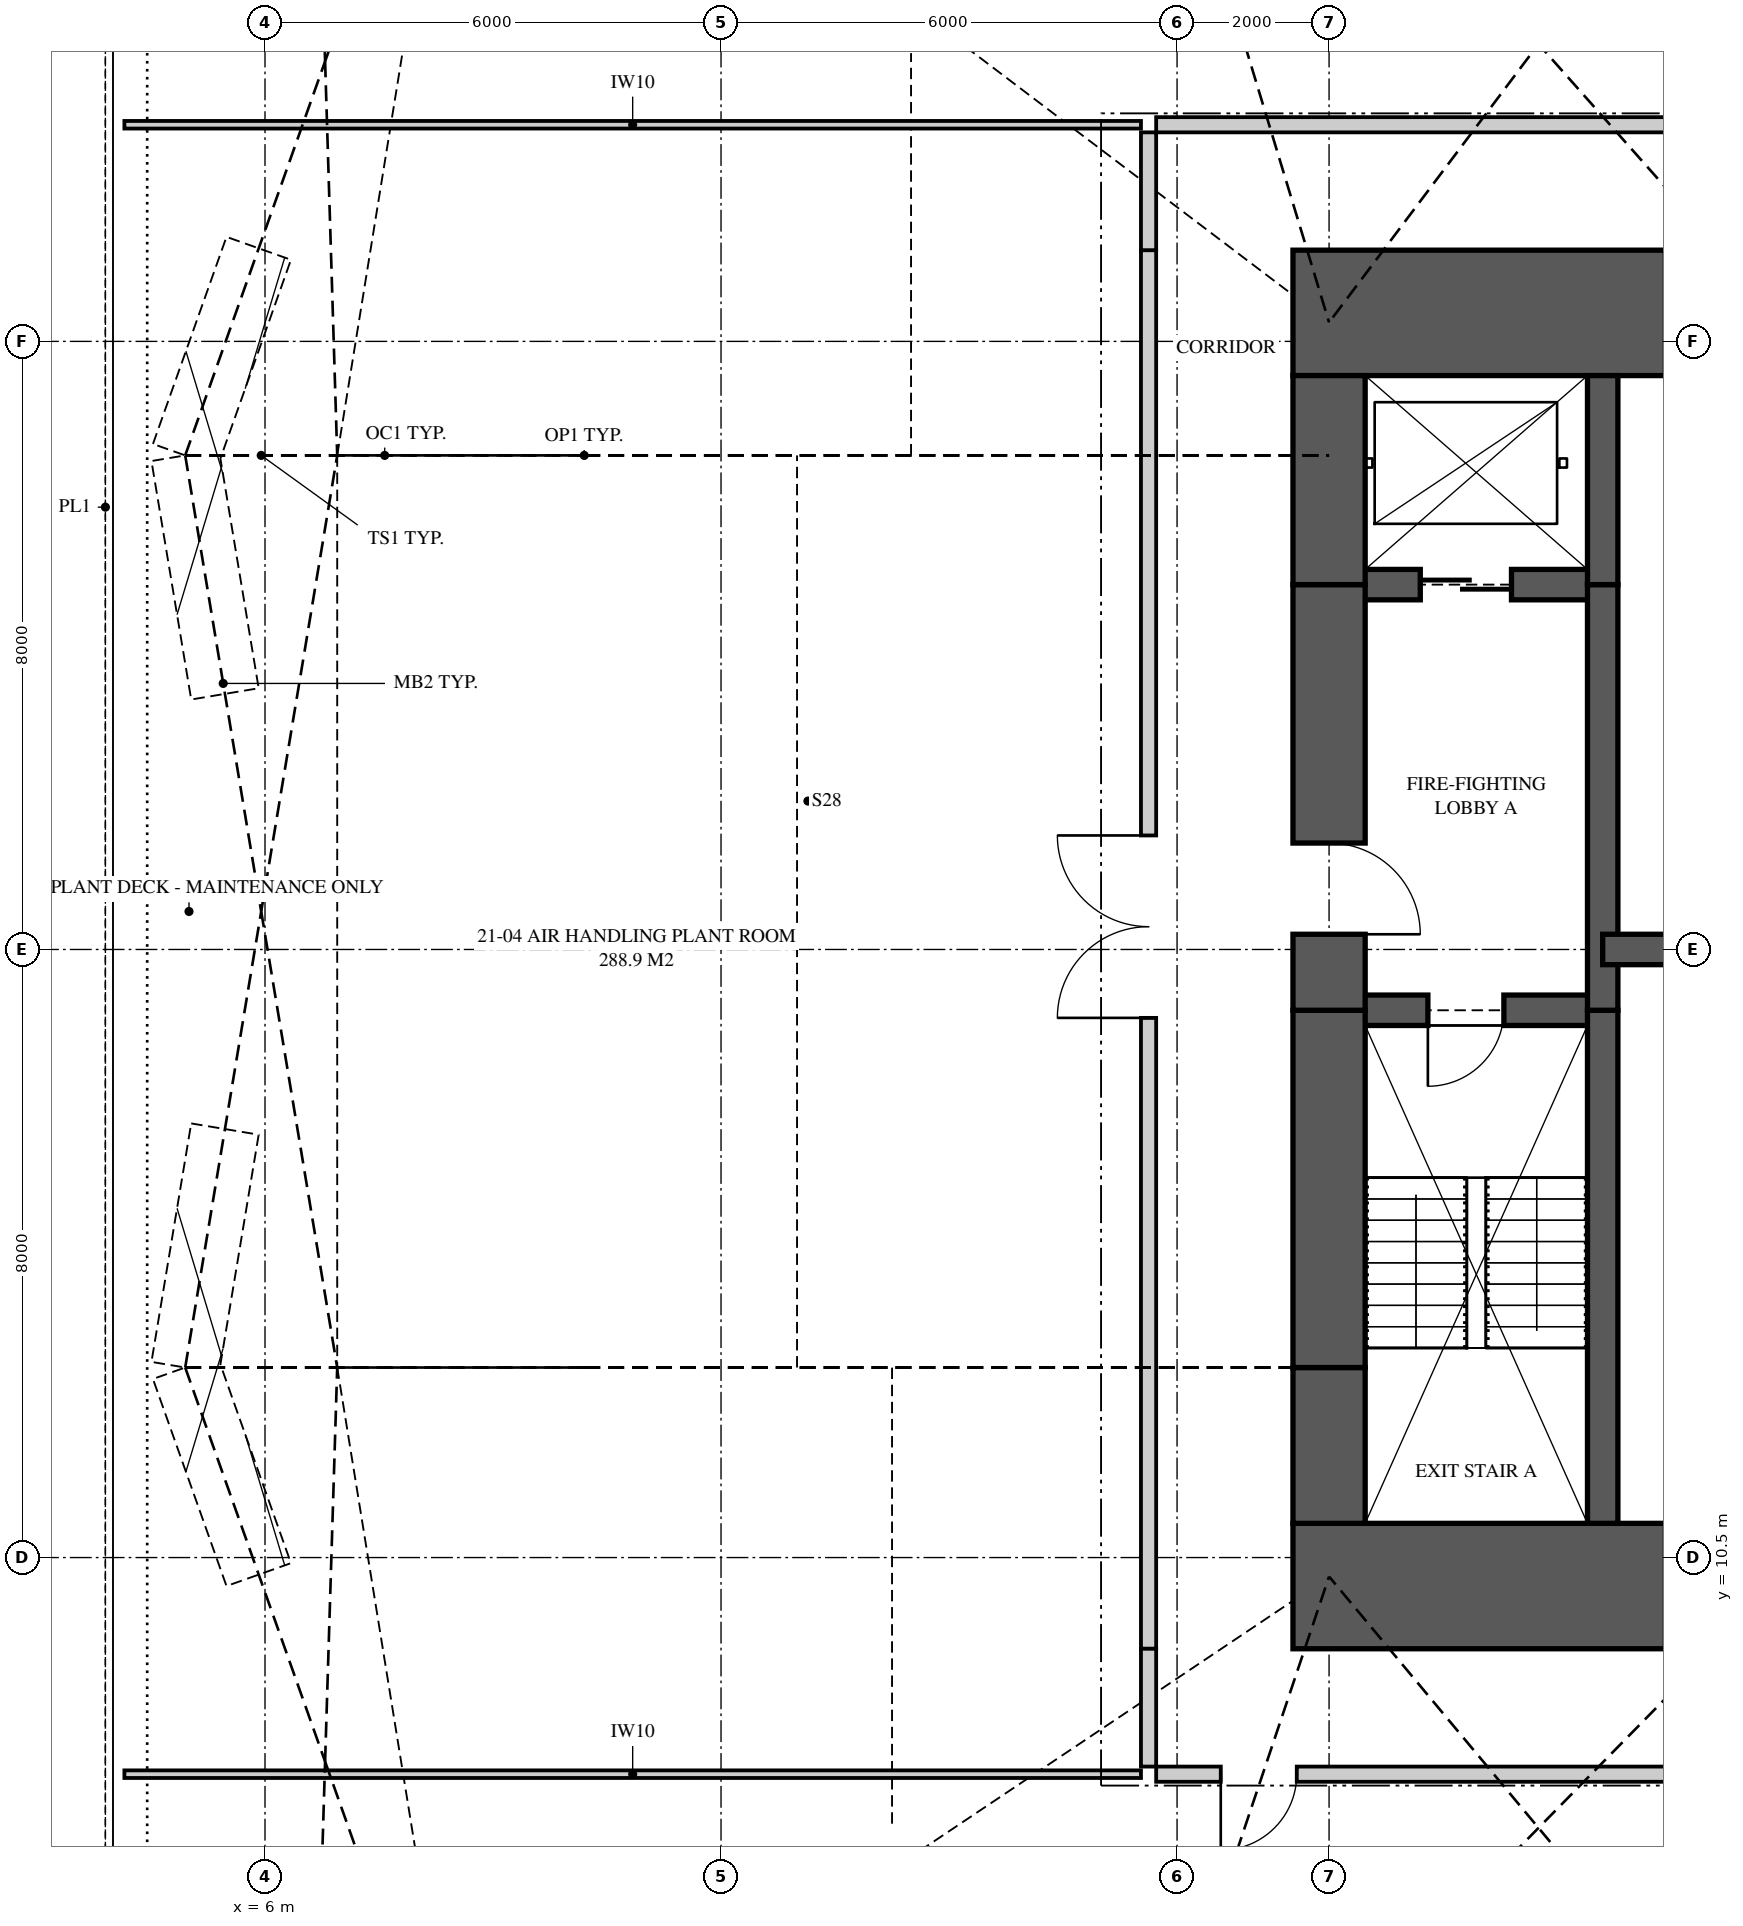
"""IFC4 building model, lengths in metres.
Left out: names, types, materials, properties, quantities, classifications, styles, units other than length and angle.
Written with IfcOpenShell. Run it as: python <this file> out.ifc"""

import sys

from ifc_helpers import new_model, si_unit, direction, frame, frame_2d, origin, place, context, subcontext, project, spatial, polyline, rectangle, outline, extrude, element, fill, save


model = new_model("IFC4")
c1 = context("Model", 3, precision=1e-05, world=origin(), true_north=direction((0.0, 1.0)))
c2 = subcontext(c1, "Body", "Model", "MODEL_VIEW")
j1 = project(units=[si_unit("LENGTHUNIT", "METRE"), si_unit("PLANEANGLEUNIT", "RADIAN")], contexts=[c1])
p1 = place(None, origin())
s1 = spatial("IfcSite", under=j1, at=p1, CompositionType="ELEMENT")
p2 = place(p1, origin())
s2 = spatial("IfcBuilding", under=s1, at=p2, CompositionType="ELEMENT")
p3 = place(p2, frame((0.0, 0.0, 79.75)))
s3 = spatial("IfcBuildingStorey", under=s2, at=p3, CompositionType="ELEMENT", Elevation=79.75)
p4 = place(p3, frame((19.525, 10.125, 0.0), z_axis=(0.0, 0.0, 1.0), x_axis=(1.0, 0.0, 0.0)))
e1 = element("IfcWall", 1, at=p4, inside=s3, PredefinedType="SHEAR", context=c2, shape_type="SweptSolid", body=[
    extrude(rectangle(XDim=6.475, YDim=1.65, at=frame_2d((3.238, 0.0))), origin(), (0.0, 0.0, 1.0), 5.0),
])
p5 = place(p4, frame((4.9, 0.0, 0.0)))
e2 = element("IfcOpeningElement", 2, at=p5, cuts=e1, PredefinedType="OPENING", context=c2, shape_type="SweptSolid", body=[
    extrude(rectangle(XDim=0.75, YDim=2.1, at=frame_2d((0.375, 1.05))), frame((0.0, 0.835, 0.0), z_axis=(0.0, -1.0, 0.0), x_axis=(1.0, 0.0, 0.0)), (0.0, 0.0, 1.0), 1.67),
])
p6 = place(p3, frame((26.0, 26.875, 0.0), z_axis=(0.0, 0.0, 1.0), x_axis=(-1.0, 0.0, 0.0)))
e3 = element("IfcWall", 3, at=p6, inside=s3, PredefinedType="SHEAR", context=c2, shape_type="SweptSolid", body=[
    extrude(rectangle(XDim=6.475, YDim=1.65, at=frame_2d((3.238, 0.0))), origin(), (0.0, 0.0, 1.0), 5.0),
])
p7 = place(p6, frame((0.825, 0.0, 0.0)))
e4 = element("IfcOpeningElement", 4, at=p7, cuts=e3, PredefinedType="OPENING", context=c2, shape_type="SweptSolid", body=[
    extrude(rectangle(XDim=0.75, YDim=2.1, at=frame_2d((0.375, 1.05))), frame((0.0, 0.835, 0.0), z_axis=(0.0, -1.0, 0.0), x_axis=(1.0, 0.0, 0.0)), (0.0, 0.0, 1.0), 1.67),
])
p8 = place(p3, frame((20.0, 26.05, 0.0), z_axis=(0.0, 0.0, 1.0), x_axis=(0.0, -1.0, 0.0)))
e5 = element("IfcWall", 5, at=p8, inside=s3, PredefinedType="SHEAR", context=c2, shape_type="SweptSolid", body=[
    extrude(rectangle(XDim=2.75, YDim=0.95, at=frame_2d((1.375, 0.0))), origin(), (0.0, 0.0, 1.0), 5.0),
])
p9 = place(p3, frame((20.0, 23.3, 0.0), z_axis=(0.0, 0.0, 1.0), x_axis=(0.0, -1.0, 0.0)))
e6 = element("IfcWall", 6, at=p9, inside=s3, PredefinedType="SHEAR", context=c2, shape_type="SweptSolid", body=[
    extrude(rectangle(XDim=5.6, YDim=0.95, at=frame_2d((2.8, 0.0))), origin(), (0.0, 0.0, 1.0), 5.0),
])
p10 = place(p9, frame((3.4, 0.0, 0.0)))
e7 = element("IfcOpeningElement", 7, at=p10, cuts=e6, PredefinedType="OPENING", context=c2, shape_type="SweptSolid", body=[
    extrude(rectangle(XDim=1.2, YDim=2.2, at=frame_2d((0.6, 1.1))), frame((0.0, 0.485, 0.0), z_axis=(0.0, -1.0, 0.0), x_axis=(1.0, 0.0, 0.0)), (0.0, 0.0, 1.0), 0.97),
])
p11 = place(p3, frame((20.0, 17.7, 0.0), z_axis=(0.0, 0.0, 1.0), x_axis=(0.0, -1.0, 0.0)))
e8 = element("IfcWall", 8, at=p11, inside=s3, PredefinedType="SHEAR", context=c2, shape_type="SweptSolid", body=[
    extrude(rectangle(XDim=4.7, YDim=0.95, at=frame_2d((2.35, 0.0))), origin(), (0.0, 0.0, 1.0), 5.0),
])
p12 = place(p3, frame((20.0, 13.0, 0.0), z_axis=(0.0, 0.0, 1.0), x_axis=(0.0, -1.0, 0.0)))
e9 = element("IfcWall", 9, at=p12, inside=s3, PredefinedType="SHEAR", context=c2, shape_type="SweptSolid", body=[
    extrude(rectangle(XDim=2.05, YDim=0.95, at=frame_2d((1.025, 0.0))), origin(), (0.0, 0.0, 1.0), 5.0),
])
p13 = place(p3, frame((23.6, 10.95, 0.0), z_axis=(0.0, 0.0, 1.0), x_axis=(0.0, 1.0, 0.0)))
e10 = element("IfcWall", 10, at=p13, inside=s3, PredefinedType="SHEAR", context=c2, shape_type="SweptSolid", body=[
    extrude(rectangle(XDim=6.75, YDim=0.4, at=frame_2d((3.375, 0.0))), origin(), (0.0, 0.0, 1.0), 5.0),
])
p14 = place(p3, frame((23.6, 17.7, 0.0), z_axis=(0.0, 0.0, 1.0), x_axis=(0.0, 1.0, 0.0)))
e11 = element("IfcWall", 11, at=p14, inside=s3, PredefinedType="SHEAR", context=c2, shape_type="SweptSolid", body=[
    extrude(rectangle(XDim=5.6, YDim=0.4, at=frame_2d((2.8, 0.0))), origin(), (0.0, 0.0, 1.0), 5.0),
])
p15 = place(p3, frame((23.6, 23.3, 0.0), z_axis=(0.0, 0.0, 1.0), x_axis=(0.0, 1.0, 0.0)))
e12 = element("IfcWall", 12, at=p15, inside=s3, PredefinedType="SHEAR", context=c2, shape_type="SweptSolid", body=[
    extrude(rectangle(XDim=2.75, YDim=0.4, at=frame_2d((1.375, 0.0))), origin(), (0.0, 0.0, 1.0), 5.0),
])
p16 = place(p3, frame((20.0, 17.7, 0.0), z_axis=(0.0, 0.0, 1.0), x_axis=(1.0, 0.0, 0.0)))
e13 = element("IfcWall", 13, at=p16, inside=s3, PredefinedType="SHEAR", context=c2, shape_type="SweptSolid", body=[
    extrude(rectangle(XDim=3.6, YDim=0.4, at=frame_2d((1.8, 0.0))), origin(), (0.0, 0.0, 1.0), 5.0),
])
p17 = place(p16, frame((1.3, 0.0, 0.0)))
e14 = element("IfcOpeningElement", 14, at=p17, cuts=e13, PredefinedType="OPENING", context=c2, shape_type="SweptSolid", body=[
    extrude(rectangle(XDim=1.0, YDim=2.1, at=frame_2d((0.5, 1.05))), frame((0.0, 0.21, 0.0), z_axis=(0.0, -1.0, 0.0), x_axis=(1.0, 0.0, 0.0)), (0.0, 0.0, 1.0), 0.42),
])
p18 = place(p3, frame((20.0, 23.3, 0.0), z_axis=(0.0, 0.0, 1.0), x_axis=(1.0, 0.0, 0.0)))
e15 = element("IfcWall", 15, at=p18, inside=s3, PredefinedType="SHEAR", context=c2, shape_type="SweptSolid", body=[
    extrude(rectangle(XDim=3.6, YDim=0.4, at=frame_2d((1.8, 0.0))), origin(), (0.0, 0.0, 1.0), 5.0),
])
p19 = place(p18, frame((1.2, 0.0, 0.0)))
e16 = element("IfcOpeningElement", 16, at=p19, cuts=e15, PredefinedType="OPENING", context=c2, shape_type="SweptSolid", body=[
    extrude(rectangle(XDim=1.2, YDim=2.1, at=frame_2d((0.6, 1.05))), frame((0.0, 0.21, 0.0), z_axis=(0.0, -1.0, 0.0), x_axis=(1.0, 0.0, 0.0)), (0.0, 0.0, 1.0), 0.42),
])
p20 = place(p3, frame((23.6, 18.5, 0.0), z_axis=(0.0, 0.0, 1.0), x_axis=(1.0, 0.0, 0.0)))
e17 = element("IfcWall", 17, at=p20, inside=s3, PredefinedType="SHEAR", context=c2, shape_type="SweptSolid", body=[
    extrude(rectangle(XDim=2.4, YDim=0.4, at=frame_2d((1.2, 0.0))), origin(), (0.0, 0.0, 1.0), 5.0),
])
p21 = place(p3, frame((17.725, 7.65, 0.0), z_axis=(0.0, 0.0, 1.0), x_axis=(1.0, 0.0, 0.0)))
e18 = element("IfcWall", 18, at=p21, inside=s3, PredefinedType="PARTITIONING", context=c2, shape_type="SweptSolid", body=[
    extrude(outline(polyline([(28.35, 0.0), (28.35, 4.72), (27.701, 4.72), (27.701, 3.22), (26.543, 3.22), (26.543, 4.72), (25.152, 4.72), (25.152, 4.141), (24.302, 4.141), (24.302, 4.72), (16.298, 4.72), (16.298, 4.141), (15.495, 4.141), (15.495, 4.72), (14.133, 4.72), (14.133, 4.141), (13.223, 4.141), (13.223, 4.72), (10.314, 4.72), (10.314, 4.194), (9.736, 4.194), (9.736, 4.72), (6.153, 4.72), (6.153, 4.141), (5.295, 4.141), (5.295, 4.72), (4.833, 4.72), (4.833, 4.141), (4.051, 4.141), (4.051, 4.72), (1.684, 4.72), (1.684, 4.141), (1.119, 4.141), (1.119, 4.72), (0.0, 4.72), (0.0, 0.0), (28.35, 0.0)]), holes=[polyline([(9.18, 3.208), (9.224, 3.323), (9.821, 3.385), (9.821, 2.858), (9.778, 2.743), (9.18, 2.68), (9.18, 3.208)])]), frame((0.0, 0.1, 0.0), z_axis=(0.0, -1.0, 0.0), x_axis=(1.0, 0.0, 0.0)), (0.0, 0.0, 1.0), 0.2),
])
p22 = place(p21, frame((0.85, 0.0, 0.0)))
e19 = element("IfcOpeningElement", 19, at=p22, cuts=e18, PredefinedType="OPENING", context=c2, shape_type="SweptSolid", body=[
    extrude(rectangle(XDim=1.0, YDim=2.1, at=frame_2d((0.5, 1.05))), frame((0.0, 0.11, 0.0), z_axis=(0.0, -1.0, 0.0), x_axis=(1.0, 0.0, 0.0)), (0.0, 0.0, 1.0), 0.22),
])
p23 = place(p21, frame((26.5, 0.0, 0.0)))
e20 = element("IfcOpeningElement", 20, at=p23, cuts=e18, PredefinedType="OPENING", context=c2, shape_type="SweptSolid", body=[
    extrude(rectangle(XDim=1.0, YDim=2.1, at=frame_2d((0.5, 1.05))), frame((0.0, 0.11, 0.0), z_axis=(0.0, -1.0, 0.0), x_axis=(1.0, 0.0, 0.0)), (0.0, 0.0, 1.0), 0.22),
])
p24 = place(p3, frame((17.625, 7.75, 0.0), z_axis=(0.0, 0.0, 1.0), x_axis=(0.0, 1.0, 0.0)))
e21 = element("IfcWall", 21, at=p24, inside=s3, PredefinedType="PARTITIONING", context=c2, shape_type="SweptSolid", body=[
    extrude(outline(polyline([(0.0, 0.0), (1.55, 0.0), (1.55, 3.22), (0.24, 3.22), (0.24, 4.72), (0.0, 4.72), (0.0, 0.0)])), frame((0.0, 0.1, 0.0), z_axis=(0.0, -1.0, 0.0), x_axis=(1.0, 0.0, 0.0)), (0.0, 0.0, 1.0), 0.2),
])
p25 = place(p3, frame((17.725, 29.35, 0.0), z_axis=(0.0, 0.0, 1.0), x_axis=(1.0, 0.0, 0.0)))
e22 = element("IfcWall", 22, at=p25, inside=s3, PredefinedType="PARTITIONING", context=c2, shape_type="SweptSolid", body=[
    extrude(outline(polyline([(28.35, 0.0), (28.35, 4.72), (27.567, 4.72), (27.567, 3.22), (26.434, 3.22), (26.434, 4.72), (25.083, 4.72), (25.083, 4.141), (24.111, 4.141), (24.111, 4.72), (16.498, 4.72), (16.498, 4.141), (15.737, 4.141), (15.737, 4.72), (13.833, 4.72), (13.833, 4.141), (12.979, 4.141), (12.979, 4.72), (10.314, 4.72), (10.314, 4.194), (9.736, 4.194), (9.736, 4.72), (6.376, 4.72), (6.376, 4.141), (5.567, 4.141), (5.567, 4.72), (4.602, 4.72), (4.602, 4.141), (3.861, 4.141), (3.861, 4.72), (1.763, 4.72), (1.763, 4.141), (1.209, 4.141), (1.209, 4.72), (0.0, 4.72), (0.0, 0.0), (28.35, 0.0)]), holes=[polyline([(9.234, 3.349), (9.274, 3.453), (9.869, 3.504), (9.869, 2.988), (9.83, 2.883), (9.234, 2.832), (9.234, 3.349)])]), frame((0.0, 0.1, 0.0), z_axis=(0.0, -1.0, 0.0), x_axis=(1.0, 0.0, 0.0)), (0.0, 0.0, 1.0), 0.2),
])
p26 = place(p25, frame((13.275, 0.0, 0.0)))
e23 = element("IfcOpeningElement", 23, at=p26, cuts=e22, PredefinedType="OPENING", context=c2, shape_type="SweptSolid", body=[
    extrude(rectangle(XDim=2.4, YDim=2.4, at=frame_2d((1.2, 1.2))), frame((0.0, 0.11, 0.0), z_axis=(0.0, -1.0, 0.0), x_axis=(1.0, 0.0, 0.0)), (0.0, 0.0, 1.0), 0.22),
])
p27 = place(p3, frame((17.625, 27.7, 0.0), z_axis=(0.0, 0.0, 1.0), x_axis=(0.0, 1.0, 0.0)))
e24 = element("IfcWall", 24, at=p27, inside=s3, PredefinedType="PARTITIONING", context=c2, shape_type="SweptSolid", body=[
    extrude(outline(polyline([(0.0, 0.0), (1.55, 0.0), (1.55, 3.22), (0.147, 3.22), (0.147, 4.72), (0.0, 4.72), (0.0, 0.0)])), frame((0.0, 0.1, 0.0), z_axis=(0.0, -1.0, 0.0), x_axis=(1.0, 0.0, 0.0)), (0.0, 0.0, 1.0), 0.2),
])
p28 = place(p3, frame((17.625, 9.3, 0.0), z_axis=(0.0, 0.0, 1.0), x_axis=(0.0, 1.0, 0.0)))
e25 = element("IfcWall", 25, at=p28, inside=s3, PredefinedType="PARTITIONING", context=c2, shape_type="SweptSolid", body=[
    extrude(outline(polyline([(18.4, 0.0), (18.4, 4.72), (16.2, 4.72), (16.2, 3.72), (15.2, 3.72), (15.2, 4.72), (4.2, 4.72), (4.2, 3.72), (3.2, 3.72), (3.2, 4.72), (0.027, 4.72), (0.027, 3.22), (0.0, 3.22), (0.0, 0.0), (18.4, 0.0)]), holes=[polyline([(3.454, 2.622), (3.454, 3.394), (3.946, 3.394), (3.946, 2.622), (3.454, 2.622)]), polyline([(15.454, 2.622), (15.454, 3.394), (15.946, 3.394), (15.946, 2.622), (15.454, 2.622)])]), frame((0.0, 0.1, 0.0), z_axis=(0.0, -1.0, 0.0), x_axis=(1.0, 0.0, 0.0)), (0.0, 0.0, 1.0), 0.2),
])
p29 = place(p28, frame((8.3, 0.0, 0.0)))
e26 = element("IfcOpeningElement", 26, at=p29, cuts=e25, PredefinedType="OPENING", context=c2, shape_type="SweptSolid", body=[
    extrude(rectangle(XDim=2.4, YDim=2.4, at=frame_2d((1.2, 1.2))), frame((0.0, 0.11, 0.0), z_axis=(0.0, -1.0, 0.0), x_axis=(1.0, 0.0, 0.0)), (0.0, 0.0, 1.0), 0.22),
])
p30 = place(p3, frame((4.15, 7.65, 0.0), z_axis=(0.0, 0.0, 1.0), x_axis=(1.0, 0.0, 0.0)))
e27 = element("IfcWall", 27, at=p30, inside=s3, PredefinedType="PARTITIONING", context=c2, shape_type="SweptSolid", body=[
    extrude(outline(polyline([(2.796, 4.72), (0.0, 4.72), (0.0, 0.0), (13.375, 0.0), (13.375, 4.72), (12.943, 4.72), (12.943, 3.22), (10.997, 3.22), (10.997, 4.12), (8.84, 4.12), (8.84, 4.72), (4.539, 4.72), (4.539, 2.9), (2.796, 2.9), (2.796, 4.72)]), holes=[polyline([(2.224, 1.047), (2.224, 1.936), (2.226, 1.973), (2.228, 1.991), (2.247, 1.991), (2.247, 2.03), (2.287, 2.081), (3.152, 2.205), (3.152, 1.32), (3.112, 1.269), (3.047, 1.26), (3.047, 1.114), (3.044, 1.059), (2.224, 1.047)])]), frame((0.0, 0.05, 0.0), z_axis=(0.0, -1.0, 0.0), x_axis=(1.0, 0.0, 0.0)), (0.0, 0.0, 1.0), 0.1),
])
p31 = place(p3, frame((4.15, 29.35, 0.0), z_axis=(0.0, 0.0, 1.0), x_axis=(1.0, 0.0, 0.0)))
e28 = element("IfcWall", 28, at=p31, inside=s3, PredefinedType="PARTITIONING", context=c2, shape_type="SweptSolid", body=[
    extrude(outline(polyline([(2.634, 4.72), (0.0, 4.72), (0.0, 0.0), (13.375, 0.0), (13.375, 4.72), (13.314, 4.72), (13.314, 3.22), (11.527, 3.22), (11.527, 4.12), (9.09, 4.12), (9.09, 4.72), (4.377, 4.72), (4.377, 2.9), (2.634, 2.9), (2.634, 4.72)]), holes=[polyline([(2.757, 0.815), (1.892, 0.692), (1.892, 1.577), (1.932, 1.628), (2.255, 1.674), (2.255, 2.389), (2.258, 2.444), (3.078, 2.456), (3.078, 1.567), (3.074, 1.512), (2.797, 1.508), (2.797, 0.867), (2.757, 0.815)])]), frame((0.0, 0.05, 0.0), z_axis=(0.0, -1.0, 0.0), x_axis=(1.0, 0.0, 0.0)), (0.0, 0.0, 1.0), 0.1),
])
p32 = place(p22, frame((1.0, 0.0, 0.0), z_axis=(0.0, 0.0, 1.0), x_axis=(-1.0, 0.0, 0.0)))
e29 = element("IfcDoor", 29, at=p32, inside=s3, OperationType="SINGLE_SWING_RIGHT", PredefinedType="DOOR", context=c2, shape_type="SweptSolid", body=[
    extrude(rectangle(XDim=1.0, YDim=2.1, at=frame_2d((0.5, 1.05))), frame((0.0, 0.025, 0.0), z_axis=(0.0, -1.0, 0.0), x_axis=(1.0, 0.0, 0.0)), (0.0, 0.0, 1.0), 0.05),
])
fill(e19, e29)
p33 = place(p29, origin())
e30 = element("IfcDoor", 30, at=p33, inside=s3, OperationType="DOUBLE_DOOR_SINGLE_SWING", PredefinedType="DOOR", context=c2, shape_type="SweptSolid", body=[
    extrude(rectangle(XDim=2.4, YDim=2.4, at=frame_2d((1.2, 1.2))), frame((0.0, 0.025, 0.0), z_axis=(0.0, -1.0, 0.0), x_axis=(1.0, 0.0, 0.0)), (0.0, 0.0, 1.0), 0.05),
])
fill(e26, e30)
p34 = place(p17, frame((1.0, 0.0, 0.0), z_axis=(0.0, 0.0, 1.0), x_axis=(-1.0, 0.0, 0.0)))
e31 = element("IfcDoor", 31, at=p34, inside=s3, OperationType="SINGLE_SWING_RIGHT", PredefinedType="DOOR", context=c2, shape_type="SweptSolid", body=[
    extrude(rectangle(XDim=1.0, YDim=2.1, at=frame_2d((0.5, 1.05))), frame((0.0, 0.025, 0.0), z_axis=(0.0, -1.0, 0.0), x_axis=(1.0, 0.0, 0.0)), (0.0, 0.0, 1.0), 0.05),
])
fill(e14, e31)
p35 = place(p10, origin())
e32 = element("IfcDoor", 32, at=p35, inside=s3, OperationType="SINGLE_SWING_RIGHT", PredefinedType="DOOR", context=c2, shape_type="SweptSolid", body=[
    extrude(rectangle(XDim=1.2, YDim=2.2, at=frame_2d((0.6, 1.1))), frame((0.0, 0.025, 0.0), z_axis=(0.0, -1.0, 0.0), x_axis=(1.0, 0.0, 0.0)), (0.0, 0.0, 1.0), 0.05),
])
fill(e7, e32)
p36 = place(p19, origin())
e33 = element("IfcDoor", 33, at=p36, inside=s3, OperationType="SLIDING_TO_LEFT", PredefinedType="DOOR", context=c2, shape_type="SweptSolid", body=[
    extrude(rectangle(XDim=1.2, YDim=2.1, at=frame_2d((0.6, 1.05))), frame((0.0, 0.025, 0.0), z_axis=(0.0, -1.0, 0.0), x_axis=(1.0, 0.0, 0.0)), (0.0, 0.0, 1.0), 0.05),
])
fill(e16, e33)
save(model, sys.argv[1])
